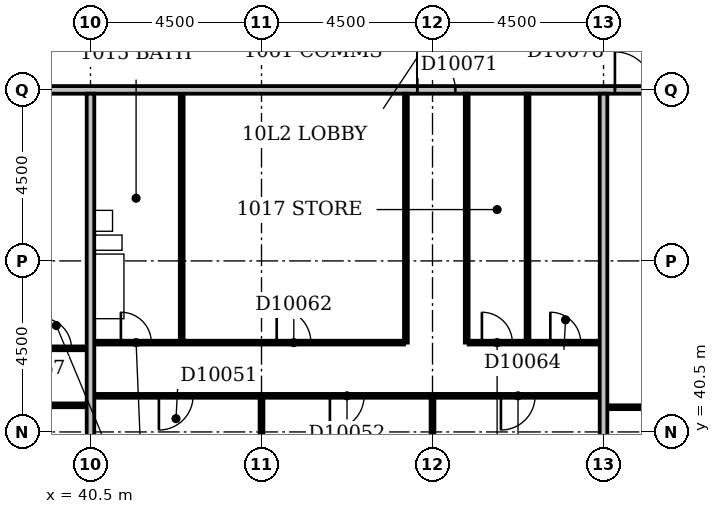
"""IFC4 building model, lengths in metres.
Left out: names, types, materials, properties, quantities, classifications, styles, units other than length and angle.
Written with IfcOpenShell. Run it as: python <this file> out.ifc"""

import sys

from ifc_helpers import new_model, si_unit, direction, frame, frame_2d, origin, place, context, subcontext, project, spatial, rectangle, extrude, element, fill, save


model = new_model("IFC4")
c1 = context("Model", 3, precision=1e-05, world=origin(), true_north=direction((0.0, 1.0)))
c2 = subcontext(c1, "Body", "Model", "MODEL_VIEW")
j1 = project(units=[si_unit("LENGTHUNIT", "METRE"), si_unit("PLANEANGLEUNIT", "RADIAN")], contexts=[c1])
p1 = place(None, origin())
s1 = spatial("IfcSite", under=j1, at=p1, CompositionType="ELEMENT")
p2 = place(p1, origin())
s2 = spatial("IfcBuilding", under=s1, at=p2, CompositionType="ELEMENT")
p3 = place(p2, frame((0.0, 0.0, 47.0)))
s3 = spatial("IfcBuildingStorey", under=s2, at=p3, CompositionType="ELEMENT", Elevation=47.0)
p4 = place(p3, frame((40.5, 36.6, 0.0), z_axis=(0.0, 0.0, 1.0), x_axis=(0.0, 1.0, 0.0)))
e1 = element("IfcWall", 1, at=p4, inside=s3, PredefinedType="PARTITIONING", context=c2, shape_type="SweptSolid", body=[
    extrude(rectangle(XDim=12.8, YDim=0.2, at=frame_2d((6.4, 0.0))), origin(), (0.0, 0.0, 1.0), 3.3),
])
p5 = place(p3, frame((45.0, 36.6, 0.0), z_axis=(0.0, 0.0, 1.0), x_axis=(0.0, 1.0, 0.0)))
e2 = element("IfcWall", 2, at=p5, inside=s3, PredefinedType="PARTITIONING", context=c2, shape_type="SweptSolid", body=[
    extrude(rectangle(XDim=4.8, YDim=0.1, at=frame_2d((2.4, 0.0))), origin(), (0.0, 0.0, 1.0), 2.6),
])
p6 = place(p3, frame((49.5, 36.6, 0.0), z_axis=(0.0, 0.0, 1.0), x_axis=(0.0, 1.0, 0.0)))
e3 = element("IfcWall", 3, at=p6, inside=s3, PredefinedType="PARTITIONING", context=c2, shape_type="SweptSolid", body=[
    extrude(rectangle(XDim=4.8, YDim=0.1, at=frame_2d((2.4, 0.0))), origin(), (0.0, 0.0, 1.0), 3.3),
])
p7 = place(p3, frame((54.0, 36.6, 0.0), z_axis=(0.0, 0.0, 1.0), x_axis=(0.0, 1.0, 0.0)))
e4 = element("IfcWall", 4, at=p7, inside=s3, PredefinedType="PARTITIONING", context=c2, shape_type="SweptSolid", body=[
    extrude(rectangle(XDim=12.8, YDim=0.2, at=frame_2d((6.4, 0.0))), origin(), (0.0, 0.0, 1.0), 2.6),
])
p8 = place(p3, frame((54.1, 41.15, 0.0), z_axis=(0.0, 0.0, 1.0), x_axis=(1.0, 0.0, 0.0)))
e5 = element("IfcWall", 5, at=p8, inside=s3, PredefinedType="PARTITIONING", context=c2, shape_type="SweptSolid", body=[
    extrude(rectangle(XDim=14.0, YDim=0.1, at=frame_2d((7.0, 0.0))), origin(), (0.0, 0.0, 1.0), 3.3),
])
p9 = place(p8, frame((1.7, 0.0, 0.0)))
e6 = element("IfcOpeningElement", 6, at=p9, cuts=e5, PredefinedType="OPENING", context=c2, shape_type="SweptSolid", body=[
    extrude(rectangle(XDim=0.9, YDim=2.1, at=frame_2d((0.45, 1.05))), frame((0.0, 0.062, 0.0), z_axis=(0.0, -1.0, 0.0), x_axis=(1.0, 0.0, 0.0)), (0.0, 0.0, 1.0), 0.124),
])
p10 = place(p8, frame((6.2, 0.0, 0.0)))
e7 = element("IfcOpeningElement", 7, at=p10, cuts=e5, PredefinedType="OPENING", context=c2, shape_type="SweptSolid", body=[
    extrude(rectangle(XDim=0.9, YDim=2.1, at=frame_2d((0.45, 1.05))), frame((0.0, 0.062, 0.0), z_axis=(0.0, -1.0, 0.0), x_axis=(1.0, 0.0, 0.0)), (0.0, 0.0, 1.0), 0.124),
])
p11 = place(p8, frame((10.7, 0.0, 0.0)))
e8 = element("IfcOpeningElement", 8, at=p11, cuts=e5, PredefinedType="OPENING", context=c2, shape_type="SweptSolid", body=[
    extrude(rectangle(XDim=0.9, YDim=2.1, at=frame_2d((0.45, 1.05))), frame((0.0, 0.062, 0.0), z_axis=(0.0, -1.0, 0.0), x_axis=(1.0, 0.0, 0.0)), (0.0, 0.0, 1.0), 0.124),
])
p12 = place(p3, frame((22.6, 41.2, 0.0), z_axis=(0.0, 0.0, 1.0), x_axis=(1.0, 0.0, 0.0)))
e9 = element("IfcWall", 9, at=p12, inside=s3, PredefinedType="PARTITIONING", context=c2, shape_type="SweptSolid", body=[
    extrude(rectangle(XDim=17.8, YDim=0.1, at=frame_2d((8.9, 0.0))), origin(), (0.0, 0.0, 1.0), 3.3),
])
p13 = place(p12, frame((1.7, 0.0, 0.0)))
e10 = element("IfcOpeningElement", 10, at=p13, cuts=e9, PredefinedType="OPENING", context=c2, shape_type="SweptSolid", body=[
    extrude(rectangle(XDim=0.9, YDim=2.1, at=frame_2d((0.45, 1.05))), frame((0.0, 0.062, 0.0), z_axis=(0.0, -1.0, 0.0), x_axis=(1.0, 0.0, 0.0)), (0.0, 0.0, 1.0), 0.124),
])
p14 = place(p12, frame((6.2, 0.0, 0.0)))
e11 = element("IfcOpeningElement", 11, at=p14, cuts=e9, PredefinedType="OPENING", context=c2, shape_type="SweptSolid", body=[
    extrude(rectangle(XDim=0.9, YDim=2.1, at=frame_2d((0.45, 1.05))), frame((0.0, 0.062, 0.0), z_axis=(0.0, -1.0, 0.0), x_axis=(1.0, 0.0, 0.0)), (0.0, 0.0, 1.0), 0.124),
])
p15 = place(p12, frame((11.85, 0.0, 0.0)))
e12 = element("IfcOpeningElement", 12, at=p15, cuts=e9, PredefinedType="OPENING", context=c2, shape_type="SweptSolid", body=[
    extrude(rectangle(XDim=0.9, YDim=2.1, at=frame_2d((0.45, 1.05))), frame((0.0, 0.062, 0.0), z_axis=(0.0, -1.0, 0.0), x_axis=(1.0, 0.0, 0.0)), (0.0, 0.0, 1.0), 0.124),
])
p16 = place(p12, frame((15.2, 0.0, 0.0)))
e13 = element("IfcOpeningElement", 13, at=p16, cuts=e9, PredefinedType="OPENING", context=c2, shape_type="SweptSolid", body=[
    extrude(rectangle(XDim=0.9, YDim=2.1, at=frame_2d((0.45, 1.05))), frame((0.0, 0.062, 0.0), z_axis=(0.0, -1.0, 0.0), x_axis=(1.0, 0.0, 0.0)), (0.0, 0.0, 1.0), 0.124),
])
p17 = place(p3, frame((40.6, 41.45, 0.0), z_axis=(0.0, 0.0, 1.0), x_axis=(1.0, 0.0, 0.0)))
e14 = element("IfcWall", 14, at=p17, inside=s3, PredefinedType="PARTITIONING", context=c2, shape_type="SweptSolid", body=[
    extrude(rectangle(XDim=13.3, YDim=0.1, at=frame_2d((6.65, 0.0))), origin(), (0.0, 0.0, 1.0), 3.3),
])
p18 = place(p17, frame((1.7, 0.0, 0.0)))
e15 = element("IfcOpeningElement", 15, at=p18, cuts=e14, PredefinedType="OPENING", context=c2, shape_type="SweptSolid", body=[
    extrude(rectangle(XDim=0.9, YDim=2.1, at=frame_2d((0.45, 1.05))), frame((0.0, 0.062, 0.0), z_axis=(0.0, -1.0, 0.0), x_axis=(1.0, 0.0, 0.0)), (0.0, 0.0, 1.0), 0.124),
])
p19 = place(p17, frame((6.2, 0.0, 0.0)))
e16 = element("IfcOpeningElement", 16, at=p19, cuts=e14, PredefinedType="OPENING", context=c2, shape_type="SweptSolid", body=[
    extrude(rectangle(XDim=0.9, YDim=2.1, at=frame_2d((0.45, 1.05))), frame((0.0, 0.062, 0.0), z_axis=(0.0, -1.0, 0.0), x_axis=(1.0, 0.0, 0.0)), (0.0, 0.0, 1.0), 0.124),
])
p20 = place(p17, frame((10.7, 0.0, 0.0)))
e17 = element("IfcOpeningElement", 17, at=p20, cuts=e14, PredefinedType="OPENING", context=c2, shape_type="SweptSolid", body=[
    extrude(rectangle(XDim=0.9, YDim=2.1, at=frame_2d((0.45, 1.05))), frame((0.0, 0.062, 0.0), z_axis=(0.0, -1.0, 0.0), x_axis=(1.0, 0.0, 0.0)), (0.0, 0.0, 1.0), 0.124),
])
p21 = place(p3, frame((26.55, 42.7, 0.0), z_axis=(0.0, 0.0, 1.0), x_axis=(1.0, 0.0, 0.0)))
e18 = element("IfcWall", 18, at=p21, inside=s3, PredefinedType="PARTITIONING", context=c2, shape_type="SweptSolid", body=[
    extrude(rectangle(XDim=13.85, YDim=0.1, at=frame_2d((6.925, 0.0))), origin(), (0.0, 0.0, 1.0), 3.3),
])
p22 = place(p21, frame((5.05, 0.0, 0.0)))
e19 = element("IfcOpeningElement", 19, at=p22, cuts=e18, PredefinedType="OPENING", context=c2, shape_type="SweptSolid", body=[
    extrude(rectangle(XDim=0.8, YDim=2.1, at=frame_2d((0.4, 1.05))), frame((0.0, 0.062, 0.0), z_axis=(0.0, -1.0, 0.0), x_axis=(1.0, 0.0, 0.0)), (0.0, 0.0, 1.0), 0.124),
])
p23 = place(p21, frame((1.7, 0.0, 0.0)))
e20 = element("IfcOpeningElement", 20, at=p23, cuts=e18, PredefinedType="OPENING", context=c2, shape_type="SweptSolid", body=[
    extrude(rectangle(XDim=0.9, YDim=2.1, at=frame_2d((0.45, 1.05))), frame((0.0, 0.062, 0.0), z_axis=(0.0, -1.0, 0.0), x_axis=(1.0, 0.0, 0.0)), (0.0, 0.0, 1.0), 0.124),
])
p24 = place(p21, frame((10.75, 0.0, 0.0)))
e21 = element("IfcOpeningElement", 21, at=p24, cuts=e18, PredefinedType="OPENING", context=c2, shape_type="SweptSolid", body=[
    extrude(rectangle(XDim=0.8, YDim=2.1, at=frame_2d((0.4, 1.05))), frame((0.0, 0.062, 0.0), z_axis=(0.0, -1.0, 0.0), x_axis=(1.0, 0.0, 0.0)), (0.0, 0.0, 1.0), 0.124),
])
p25 = place(p21, frame((6.95, 0.0, 0.0)))
e22 = element("IfcOpeningElement", 22, at=p25, cuts=e18, PredefinedType="OPENING", context=c2, shape_type="SweptSolid", body=[
    extrude(rectangle(XDim=0.8, YDim=2.1, at=frame_2d((0.4, 1.05))), frame((0.0, 0.062, 0.0), z_axis=(0.0, -1.0, 0.0), x_axis=(1.0, 0.0, 0.0)), (0.0, 0.0, 1.0), 0.124),
])
p26 = place(p21, frame((8.75, 0.0, 0.0)))
e23 = element("IfcOpeningElement", 23, at=p26, cuts=e18, PredefinedType="OPENING", context=c2, shape_type="SweptSolid", body=[
    extrude(rectangle(XDim=0.8, YDim=2.1, at=frame_2d((0.4, 1.05))), frame((0.0, 0.062, 0.0), z_axis=(0.0, -1.0, 0.0), x_axis=(1.0, 0.0, 0.0)), (0.0, 0.0, 1.0), 0.124),
])
p27 = place(p21, frame((12.65, 0.0, 0.0)))
e24 = element("IfcOpeningElement", 24, at=p27, cuts=e18, PredefinedType="OPENING", context=c2, shape_type="SweptSolid", body=[
    extrude(rectangle(XDim=0.8, YDim=2.1, at=frame_2d((0.4, 1.05))), frame((0.0, 0.062, 0.0), z_axis=(0.0, -1.0, 0.0), x_axis=(1.0, 0.0, 0.0)), (0.0, 0.0, 1.0), 0.124),
])
p28 = place(p3, frame((40.6, 42.85, 0.0), z_axis=(0.0, 0.0, 1.0), x_axis=(1.0, 0.0, 0.0)))
e25 = element("IfcWall", 25, at=p28, inside=s3, PredefinedType="PARTITIONING", context=c2, shape_type="SweptSolid", body=[
    extrude(rectangle(XDim=8.15, YDim=0.1, at=frame_2d((4.075, 0.0))), origin(), (0.0, 0.0, 1.0), 3.3),
])
p29 = place(p28, frame((0.7, 0.0, 0.0)))
e26 = element("IfcOpeningElement", 26, at=p29, cuts=e25, PredefinedType="OPENING", context=c2, shape_type="SweptSolid", body=[
    extrude(rectangle(XDim=0.8, YDim=2.1, at=frame_2d((0.4, 1.05))), frame((0.0, 0.062, 0.0), z_axis=(0.0, -1.0, 0.0), x_axis=(1.0, 0.0, 0.0)), (0.0, 0.0, 1.0), 0.124),
])
p30 = place(p28, frame((4.8, 0.0, 0.0)))
e27 = element("IfcOpeningElement", 27, at=p30, cuts=e25, PredefinedType="OPENING", context=c2, shape_type="SweptSolid", body=[
    extrude(rectangle(XDim=0.9, YDim=2.1, at=frame_2d((0.45, 1.05))), frame((0.0, 0.062, 0.0), z_axis=(0.0, -1.0, 0.0), x_axis=(1.0, 0.0, 0.0)), (0.0, 0.0, 1.0), 0.124),
])
for number, where, z_axis, x_axis in (
    (28, (48.8, 42.85, 0.0), (0.0, 0.0, 1.0), (0.0, 1.0, 0.0)),
    (29, (50.4, 42.85, 0.0), (0.0, 0.0, 1.0), (0.0, 1.0, 0.0)),
):
    element("IfcWall", number, at=place(p3, frame(where, z_axis=z_axis, x_axis=x_axis)), inside=s3, PredefinedType="PARTITIONING", context=c2, shape_type="SweptSolid", body=[
        extrude(rectangle(XDim=6.55, YDim=0.1, at=frame_2d((3.275, 0.0))), origin(), (0.0, 0.0, 1.0), 3.3),
    ])
p31 = place(p3, frame((50.45, 42.85, 0.0), z_axis=(0.0, 0.0, 1.0), x_axis=(1.0, 0.0, 0.0)))
e30 = element("IfcWall", 30, at=p31, inside=s3, PredefinedType="PARTITIONING", context=c2, shape_type="SweptSolid", body=[
    extrude(rectangle(XDim=3.45, YDim=0.1, at=frame_2d((1.725, 0.0))), origin(), (0.0, 0.0, 1.0), 3.3),
])
p32 = place(p31, frame((0.35, 0.0, 0.0)))
e31 = element("IfcOpeningElement", 31, at=p32, cuts=e30, PredefinedType="OPENING", context=c2, shape_type="SweptSolid", body=[
    extrude(rectangle(XDim=0.8, YDim=2.1, at=frame_2d((0.4, 1.05))), frame((0.0, 0.062, 0.0), z_axis=(0.0, -1.0, 0.0), x_axis=(1.0, 0.0, 0.0)), (0.0, 0.0, 1.0), 0.124),
])
p33 = place(p31, frame((2.15, 0.0, 0.0)))
e32 = element("IfcOpeningElement", 32, at=p33, cuts=e30, PredefinedType="OPENING", context=c2, shape_type="SweptSolid", body=[
    extrude(rectangle(XDim=0.8, YDim=2.1, at=frame_2d((0.4, 1.05))), frame((0.0, 0.062, 0.0), z_axis=(0.0, -1.0, 0.0), x_axis=(1.0, 0.0, 0.0)), (0.0, 0.0, 1.0), 0.124),
])
p34 = place(p3, frame((42.9, 42.9, 0.0), z_axis=(0.0, 0.0, 1.0), x_axis=(0.0, 1.0, 0.0)))
e33 = element("IfcWall", 33, at=p34, inside=s3, PredefinedType="PLUMBINGWALL", context=c2, shape_type="SweptSolid", body=[
    extrude(rectangle(XDim=6.5, YDim=0.1, at=frame_2d((3.25, 0.0))), origin(), (0.0, 0.0, 1.0), 3.3),
])
p35 = place(p3, frame((52.0, 42.9, 0.0), z_axis=(0.0, 0.0, 1.0), x_axis=(0.0, 1.0, 0.0)))
e34 = element("IfcWall", 34, at=p35, inside=s3, PredefinedType="PARTITIONING", context=c2, shape_type="SweptSolid", body=[
    extrude(rectangle(XDim=6.5, YDim=0.1, at=frame_2d((3.25, 0.0))), origin(), (0.0, 0.0, 1.0), 3.3),
])
p36 = place(p3, frame((9.1, 49.5, 0.0), z_axis=(0.0, 0.0, 1.0), x_axis=(1.0, 0.0, 0.0)))
e35 = element("IfcWall", 35, at=p36, inside=s3, PredefinedType="PARTITIONING", context=c2, shape_type="SweptSolid", body=[
    extrude(rectangle(XDim=57.8, YDim=0.2, at=frame_2d((28.9, 0.0))), origin(), (0.0, 0.0, 1.0), 3.3),
])
p37 = place(p36, frame((16.1, 0.0, 0.0)))
e36 = element("IfcOpeningElement", 36, at=p37, cuts=e35, PredefinedType="OPENING", context=c2, shape_type="SweptSolid", body=[
    extrude(rectangle(XDim=1.0, YDim=2.1, at=frame_2d((0.5, 1.05))), frame((0.0, 0.112, 0.0), z_axis=(0.0, -1.0, 0.0), x_axis=(1.0, 0.0, 0.0)), (0.0, 0.0, 1.0), 0.224),
])
p38 = place(p36, frame((40.0, 0.0, 0.0)))
e37 = element("IfcOpeningElement", 37, at=p38, cuts=e35, PredefinedType="OPENING", context=c2, shape_type="SweptSolid", body=[
    extrude(rectangle(XDim=1.0, YDim=2.1, at=frame_2d((0.5, 1.05))), frame((0.0, 0.112, 0.0), z_axis=(0.0, -1.0, 0.0), x_axis=(1.0, 0.0, 0.0)), (0.0, 0.0, 1.0), 0.224),
])
p39 = place(p36, frame((45.2, 0.0, 0.0)))
e38 = element("IfcOpeningElement", 38, at=p39, cuts=e35, PredefinedType="OPENING", context=c2, shape_type="SweptSolid", body=[
    extrude(rectangle(XDim=1.0, YDim=2.1, at=frame_2d((0.5, 1.05))), frame((0.0, 0.112, 0.0), z_axis=(0.0, -1.0, 0.0), x_axis=(1.0, 0.0, 0.0)), (0.0, 0.0, 1.0), 0.224),
])
p40 = place(p36, frame((3.9, 0.0, 0.0)))
e39 = element("IfcOpeningElement", 39, at=p40, cuts=e35, PredefinedType="OPENING", context=c2, shape_type="SweptSolid", body=[
    extrude(rectangle(XDim=0.9, YDim=2.1, at=frame_2d((0.45, 1.05))), frame((0.0, 0.112, 0.0), z_axis=(0.0, -1.0, 0.0), x_axis=(1.0, 0.0, 0.0)), (0.0, 0.0, 1.0), 0.224),
])
p41 = place(p18, frame((0.9, 0.0, 0.0), z_axis=(0.0, 0.0, 1.0), x_axis=(-1.0, 0.0, 0.0)))
e40 = element("IfcDoor", 40, at=p41, inside=s3, OperationType="SINGLE_SWING_RIGHT", PredefinedType="DOOR", context=c2, shape_type="SweptSolid", body=[
    extrude(rectangle(XDim=0.9, YDim=2.1, at=frame_2d((0.45, 1.05))), frame((0.0, 0.025, 0.0), z_axis=(0.0, -1.0, 0.0), x_axis=(1.0, 0.0, 0.0)), (0.0, 0.0, 1.0), 0.05),
])
fill(e15, e40)
p42 = place(p19, frame((0.9, 0.0, 0.0), z_axis=(0.0, 0.0, 1.0), x_axis=(-1.0, 0.0, 0.0)))
e41 = element("IfcDoor", 41, at=p42, inside=s3, OperationType="SINGLE_SWING_RIGHT", PredefinedType="DOOR", context=c2, shape_type="SweptSolid", body=[
    extrude(rectangle(XDim=0.9, YDim=2.1, at=frame_2d((0.45, 1.05))), frame((0.0, 0.025, 0.0), z_axis=(0.0, -1.0, 0.0), x_axis=(1.0, 0.0, 0.0)), (0.0, 0.0, 1.0), 0.05),
])
fill(e16, e41)
p43 = place(p20, frame((0.9, 0.0, 0.0), z_axis=(0.0, 0.0, 1.0), x_axis=(-1.0, 0.0, 0.0)))
e42 = element("IfcDoor", 42, at=p43, inside=s3, OperationType="SINGLE_SWING_RIGHT", PredefinedType="DOOR", context=c2, shape_type="SweptSolid", body=[
    extrude(rectangle(XDim=0.9, YDim=2.1, at=frame_2d((0.45, 1.05))), frame((0.0, 0.025, 0.0), z_axis=(0.0, -1.0, 0.0), x_axis=(1.0, 0.0, 0.0)), (0.0, 0.0, 1.0), 0.05),
])
fill(e17, e42)
p44 = place(p27, origin())
e43 = element("IfcDoor", 43, at=p44, inside=s3, OperationType="SINGLE_SWING_LEFT", PredefinedType="DOOR", context=c2, shape_type="SweptSolid", body=[
    extrude(rectangle(XDim=0.8, YDim=2.1, at=frame_2d((0.4, 1.05))), frame((0.0, 0.025, 0.0), z_axis=(0.0, -1.0, 0.0), x_axis=(1.0, 0.0, 0.0)), (0.0, 0.0, 1.0), 0.05),
])
fill(e24, e43)
p45 = place(p29, origin())
e44 = element("IfcDoor", 44, at=p45, inside=s3, OperationType="SINGLE_SWING_LEFT", PredefinedType="DOOR", context=c2, shape_type="SweptSolid", body=[
    extrude(rectangle(XDim=0.8, YDim=2.1, at=frame_2d((0.4, 1.05))), frame((0.0, 0.025, 0.0), z_axis=(0.0, -1.0, 0.0), x_axis=(1.0, 0.0, 0.0)), (0.0, 0.0, 1.0), 0.05),
])
fill(e26, e44)
p46 = place(p30, origin())
e45 = element("IfcDoor", 45, at=p46, inside=s3, OperationType="SINGLE_SWING_LEFT", PredefinedType="DOOR", context=c2, shape_type="SweptSolid", body=[
    extrude(rectangle(XDim=0.9, YDim=2.1, at=frame_2d((0.45, 1.05))), frame((0.0, 0.025, 0.0), z_axis=(0.0, -1.0, 0.0), x_axis=(1.0, 0.0, 0.0)), (0.0, 0.0, 1.0), 0.05),
])
fill(e27, e45)
p47 = place(p32, origin())
e46 = element("IfcDoor", 46, at=p47, inside=s3, OperationType="SINGLE_SWING_LEFT", PredefinedType="DOOR", context=c2, shape_type="SweptSolid", body=[
    extrude(rectangle(XDim=0.8, YDim=2.1, at=frame_2d((0.4, 1.05))), frame((0.0, 0.025, 0.0), z_axis=(0.0, -1.0, 0.0), x_axis=(1.0, 0.0, 0.0)), (0.0, 0.0, 1.0), 0.05),
])
fill(e31, e46)
p48 = place(p33, origin())
e47 = element("IfcDoor", 47, at=p48, inside=s3, OperationType="SINGLE_SWING_LEFT", PredefinedType="DOOR", context=c2, shape_type="SweptSolid", body=[
    extrude(rectangle(XDim=0.8, YDim=2.1, at=frame_2d((0.4, 1.05))), frame((0.0, 0.025, 0.0), z_axis=(0.0, -1.0, 0.0), x_axis=(1.0, 0.0, 0.0)), (0.0, 0.0, 1.0), 0.05),
])
fill(e32, e47)
p49 = place(p38, origin())
e48 = element("IfcDoor", 48, at=p49, inside=s3, OperationType="SINGLE_SWING_LEFT", PredefinedType="DOOR", context=c2, shape_type="SweptSolid", body=[
    extrude(rectangle(XDim=1.0, YDim=2.1, at=frame_2d((0.5, 1.05))), frame((0.0, 0.025, 0.0), z_axis=(0.0, -1.0, 0.0), x_axis=(1.0, 0.0, 0.0)), (0.0, 0.0, 1.0), 0.05),
])
fill(e37, e48)
p50 = place(p39, origin())
e49 = element("IfcDoor", 49, at=p50, inside=s3, OperationType="SINGLE_SWING_LEFT", PredefinedType="DOOR", context=c2, shape_type="SweptSolid", body=[
    extrude(rectangle(XDim=1.0, YDim=2.1, at=frame_2d((0.5, 1.05))), frame((0.0, 0.025, 0.0), z_axis=(0.0, -1.0, 0.0), x_axis=(1.0, 0.0, 0.0)), (0.0, 0.0, 1.0), 0.05),
])
fill(e38, e49)
save(model, sys.argv[1])
